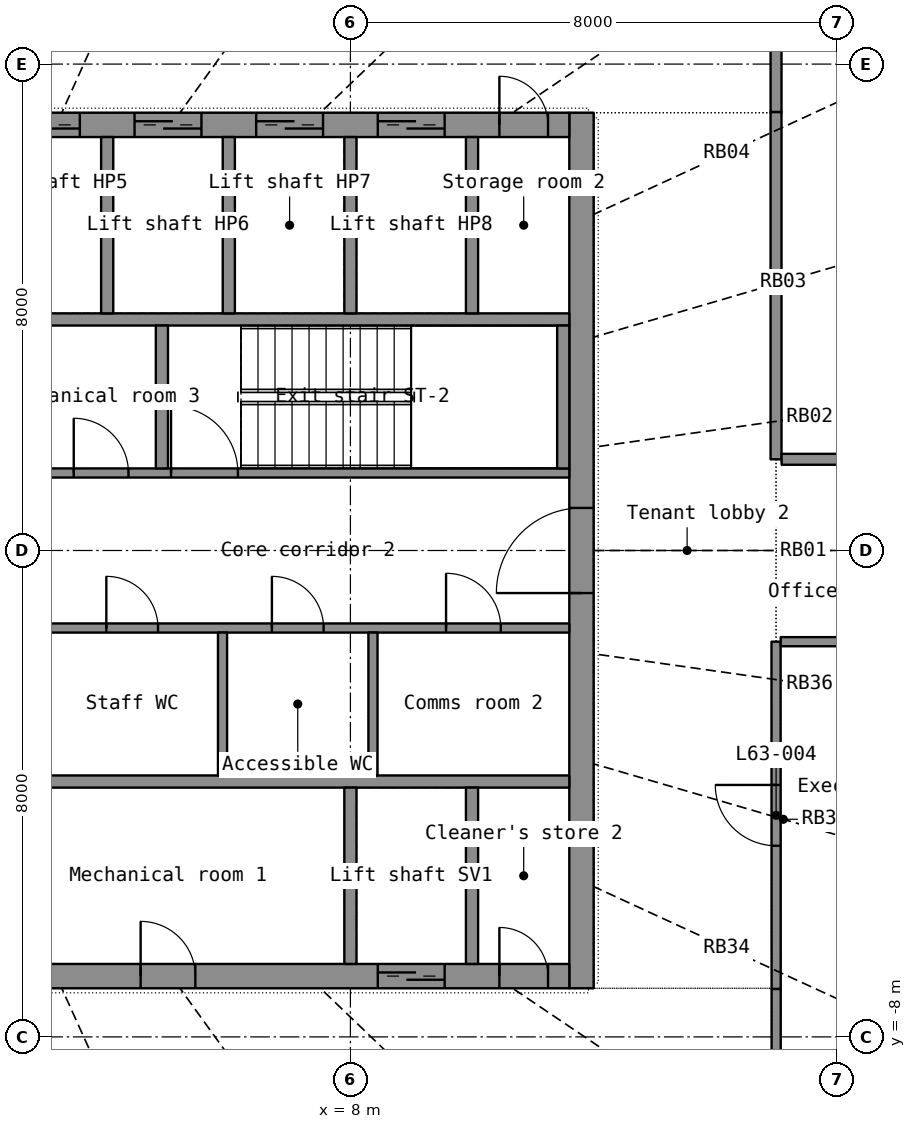
"""IFC4 building model, lengths in metres.
Left out: names, types, materials, properties, quantities, classifications, styles, units other than length and angle.
Written with IfcOpenShell. Run it as: python <this file> out.ifc"""

import sys

from ifc_helpers import new_model, si_unit, direction, frame, frame_2d, origin, place, context, subcontext, project, spatial, rectangle, extrude, element, fill, save


model = new_model("IFC4")
c1 = context("Model", 3, precision=1e-05, world=origin(), true_north=direction((0.0, 1.0)))
c2 = subcontext(c1, "Body", "Model", "MODEL_VIEW")
j1 = project(units=[si_unit("LENGTHUNIT", "METRE"), si_unit("PLANEANGLEUNIT", "RADIAN")], contexts=[c1])
p1 = place(None, origin())
s1 = spatial("IfcSite", under=j1, at=p1, CompositionType="ELEMENT")
p2 = place(p1, origin())
s2 = spatial("IfcBuilding", under=s1, at=p2, CompositionType="ELEMENT")
p3 = place(p2, frame((0.0, 0.0, 257.8)))
s3 = spatial("IfcBuildingStorey", under=s2, at=p3, CompositionType="ELEMENT", Elevation=257.8)
p4 = place(p3, frame((11.8, -7.2, 0.0), z_axis=(0.0, 0.0, 1.0), x_axis=(0.0, 1.0, 0.0)))
e1 = element("IfcWall", 1, at=p4, inside=s3, PredefinedType="SHEAR", context=c2, shape_type="SweptSolid", body=[
    extrude(rectangle(XDim=14.4, YDim=0.4, at=frame_2d((7.2, 0.0))), origin(), (0.0, 0.0, 1.0), 3.3),
])
p5 = place(p4, frame((6.5, 0.0, 0.0)))
e2 = element("IfcOpeningElement", 2, at=p5, cuts=e1, PredefinedType="OPENING", context=c2, shape_type="SweptSolid", body=[
    extrude(rectangle(XDim=1.4, YDim=2.2, at=frame_2d((0.7, 1.1))), frame((0.0, 0.21, 0.0), z_axis=(0.0, -1.0, 0.0), x_axis=(1.0, 0.0, 0.0)), (0.0, 0.0, 1.0), 0.42),
])
p6 = place(p3, frame((-11.6, -7.0, 0.0), z_axis=(0.0, 0.0, 1.0), x_axis=(1.0, 0.0, 0.0)))
e3 = element("IfcWall", 3, at=p6, inside=s3, PredefinedType="SHEAR", context=c2, shape_type="SweptSolid", body=[
    extrude(rectangle(XDim=23.2, YDim=0.4, at=frame_2d((11.6, 0.0))), origin(), (0.0, 0.0, 1.0), 3.3),
])
p7 = place(p6, frame((20.05, 0.0, 0.0)))
e4 = element("IfcOpeningElement", 4, at=p7, cuts=e3, PredefinedType="OPENING", context=c2, shape_type="SweptSolid", body=[
    extrude(rectangle(XDim=1.1, YDim=2.2, at=frame_2d((0.55, 1.1))), frame((0.0, 0.21, 0.0), z_axis=(0.0, -1.0, 0.0), x_axis=(1.0, 0.0, 0.0)), (0.0, 0.0, 1.0), 0.42),
])
p8 = place(p6, frame((4.15, 0.0, 0.0)))
e5 = element("IfcOpeningElement", 5, at=p8, cuts=e3, PredefinedType="OPENING", context=c2, shape_type="SweptSolid", body=[
    extrude(rectangle(XDim=0.9, YDim=2.1, at=frame_2d((0.45, 1.05))), frame((0.0, 0.21, 0.0), z_axis=(0.0, -1.0, 0.0), x_axis=(1.0, 0.0, 0.0)), (0.0, 0.0, 1.0), 0.42),
])
p9 = place(p6, frame((10.15, 0.0, 0.0)))
e6 = element("IfcOpeningElement", 6, at=p9, cuts=e3, PredefinedType="OPENING", context=c2, shape_type="SweptSolid", body=[
    extrude(rectangle(XDim=0.9, YDim=2.1, at=frame_2d((0.45, 1.05))), frame((0.0, 0.21, 0.0), z_axis=(0.0, -1.0, 0.0), x_axis=(1.0, 0.0, 0.0)), (0.0, 0.0, 1.0), 0.42),
])
p10 = place(p6, frame((16.15, 0.0, 0.0)))
e7 = element("IfcOpeningElement", 7, at=p10, cuts=e3, PredefinedType="OPENING", context=c2, shape_type="SweptSolid", body=[
    extrude(rectangle(XDim=0.9, YDim=2.1, at=frame_2d((0.45, 1.05))), frame((0.0, 0.21, 0.0), z_axis=(0.0, -1.0, 0.0), x_axis=(1.0, 0.0, 0.0)), (0.0, 0.0, 1.0), 0.42),
])
p11 = place(p6, frame((0.35, 0.0, 0.0)))
e8 = element("IfcOpeningElement", 8, at=p11, cuts=e3, PredefinedType="OPENING", context=c2, shape_type="SweptSolid", body=[
    extrude(rectangle(XDim=0.8, YDim=2.05, at=frame_2d((0.4, 1.025))), frame((0.0, 0.21, 0.0), z_axis=(0.0, -1.0, 0.0), x_axis=(1.0, 0.0, 0.0)), (0.0, 0.0, 1.0), 0.42),
])
p12 = place(p6, frame((22.05, 0.0, 0.0)))
e9 = element("IfcOpeningElement", 9, at=p12, cuts=e3, PredefinedType="OPENING", context=c2, shape_type="SweptSolid", body=[
    extrude(rectangle(XDim=0.8, YDim=2.05, at=frame_2d((0.4, 1.025))), frame((0.0, 0.21, 0.0), z_axis=(0.0, -1.0, 0.0), x_axis=(1.0, 0.0, 0.0)), (0.0, 0.0, 1.0), 0.42),
])
p13 = place(p3, frame((-11.6, 7.0, 0.0), z_axis=(0.0, 0.0, 1.0), x_axis=(1.0, 0.0, 0.0)))
e10 = element("IfcWall", 10, at=p13, inside=s3, PredefinedType="SHEAR", context=c2, shape_type="SweptSolid", body=[
    extrude(rectangle(XDim=23.2, YDim=0.4, at=frame_2d((11.6, 0.0))), origin(), (0.0, 0.0, 1.0), 3.3),
])
p14 = place(p13, frame((2.05, 0.0, 0.0)))
e11 = element("IfcOpeningElement", 11, at=p14, cuts=e10, PredefinedType="OPENING", context=c2, shape_type="SweptSolid", body=[
    extrude(rectangle(XDim=1.1, YDim=2.2, at=frame_2d((0.55, 1.1))), frame((0.0, 0.21, 0.0), z_axis=(0.0, -1.0, 0.0), x_axis=(1.0, 0.0, 0.0)), (0.0, 0.0, 1.0), 0.42),
])
p15 = place(p13, frame((6.05, 0.0, 0.0)))
e12 = element("IfcOpeningElement", 12, at=p15, cuts=e10, PredefinedType="OPENING", context=c2, shape_type="SweptSolid", body=[
    extrude(rectangle(XDim=1.1, YDim=2.2, at=frame_2d((0.55, 1.1))), frame((0.0, 0.21, 0.0), z_axis=(0.0, -1.0, 0.0), x_axis=(1.0, 0.0, 0.0)), (0.0, 0.0, 1.0), 0.42),
])
p16 = place(p13, frame((8.05, 0.0, 0.0)))
e13 = element("IfcOpeningElement", 13, at=p16, cuts=e10, PredefinedType="OPENING", context=c2, shape_type="SweptSolid", body=[
    extrude(rectangle(XDim=1.1, YDim=2.2, at=frame_2d((0.55, 1.1))), frame((0.0, 0.21, 0.0), z_axis=(0.0, -1.0, 0.0), x_axis=(1.0, 0.0, 0.0)), (0.0, 0.0, 1.0), 0.42),
])
p17 = place(p13, frame((10.05, 0.0, 0.0)))
e14 = element("IfcOpeningElement", 14, at=p17, cuts=e10, PredefinedType="OPENING", context=c2, shape_type="SweptSolid", body=[
    extrude(rectangle(XDim=1.1, YDim=2.2, at=frame_2d((0.55, 1.1))), frame((0.0, 0.21, 0.0), z_axis=(0.0, -1.0, 0.0), x_axis=(1.0, 0.0, 0.0)), (0.0, 0.0, 1.0), 0.42),
])
p18 = place(p13, frame((12.05, 0.0, 0.0)))
e15 = element("IfcOpeningElement", 15, at=p18, cuts=e10, PredefinedType="OPENING", context=c2, shape_type="SweptSolid", body=[
    extrude(rectangle(XDim=1.1, YDim=2.2, at=frame_2d((0.55, 1.1))), frame((0.0, 0.21, 0.0), z_axis=(0.0, -1.0, 0.0), x_axis=(1.0, 0.0, 0.0)), (0.0, 0.0, 1.0), 0.42),
])
p19 = place(p13, frame((14.05, 0.0, 0.0)))
e16 = element("IfcOpeningElement", 16, at=p19, cuts=e10, PredefinedType="OPENING", context=c2, shape_type="SweptSolid", body=[
    extrude(rectangle(XDim=1.1, YDim=2.2, at=frame_2d((0.55, 1.1))), frame((0.0, 0.21, 0.0), z_axis=(0.0, -1.0, 0.0), x_axis=(1.0, 0.0, 0.0)), (0.0, 0.0, 1.0), 0.42),
])
p20 = place(p13, frame((16.05, 0.0, 0.0)))
e17 = element("IfcOpeningElement", 17, at=p20, cuts=e10, PredefinedType="OPENING", context=c2, shape_type="SweptSolid", body=[
    extrude(rectangle(XDim=1.1, YDim=2.2, at=frame_2d((0.55, 1.1))), frame((0.0, 0.21, 0.0), z_axis=(0.0, -1.0, 0.0), x_axis=(1.0, 0.0, 0.0)), (0.0, 0.0, 1.0), 0.42),
])
p21 = place(p13, frame((18.05, 0.0, 0.0)))
e18 = element("IfcOpeningElement", 18, at=p21, cuts=e10, PredefinedType="OPENING", context=c2, shape_type="SweptSolid", body=[
    extrude(rectangle(XDim=1.1, YDim=2.2, at=frame_2d((0.55, 1.1))), frame((0.0, 0.21, 0.0), z_axis=(0.0, -1.0, 0.0), x_axis=(1.0, 0.0, 0.0)), (0.0, 0.0, 1.0), 0.42),
])
p22 = place(p13, frame((20.05, 0.0, 0.0)))
e19 = element("IfcOpeningElement", 19, at=p22, cuts=e10, PredefinedType="OPENING", context=c2, shape_type="SweptSolid", body=[
    extrude(rectangle(XDim=1.1, YDim=2.2, at=frame_2d((0.55, 1.1))), frame((0.0, 0.21, 0.0), z_axis=(0.0, -1.0, 0.0), x_axis=(1.0, 0.0, 0.0)), (0.0, 0.0, 1.0), 0.42),
])
p23 = place(p13, frame((4.15, 0.0, 0.0)))
e20 = element("IfcOpeningElement", 20, at=p23, cuts=e10, PredefinedType="OPENING", context=c2, shape_type="SweptSolid", body=[
    extrude(rectangle(XDim=0.9, YDim=2.1, at=frame_2d((0.45, 1.05))), frame((0.0, 0.21, 0.0), z_axis=(0.0, -1.0, 0.0), x_axis=(1.0, 0.0, 0.0)), (0.0, 0.0, 1.0), 0.42),
])
p24 = place(p13, frame((0.35, 0.0, 0.0)))
e21 = element("IfcOpeningElement", 21, at=p24, cuts=e10, PredefinedType="OPENING", context=c2, shape_type="SweptSolid", body=[
    extrude(rectangle(XDim=0.8, YDim=2.05, at=frame_2d((0.4, 1.025))), frame((0.0, 0.21, 0.0), z_axis=(0.0, -1.0, 0.0), x_axis=(1.0, 0.0, 0.0)), (0.0, 0.0, 1.0), 0.42),
])
p25 = place(p13, frame((22.05, 0.0, 0.0)))
e22 = element("IfcOpeningElement", 22, at=p25, cuts=e10, PredefinedType="OPENING", context=c2, shape_type="SweptSolid", body=[
    extrude(rectangle(XDim=0.8, YDim=2.05, at=frame_2d((0.4, 1.025))), frame((0.0, 0.21, 0.0), z_axis=(0.0, -1.0, 0.0), x_axis=(1.0, 0.0, 0.0)), (0.0, 0.0, 1.0), 0.42),
])
for number, where, z_axis, x_axis in (
    (23, (-11.6, -3.8, 0.0), (0.0, 0.0, 1.0), (1.0, 0.0, 0.0)),
    (24, (-11.6, 3.8, 0.0), (0.0, 0.0, 1.0), (1.0, 0.0, 0.0)),
):
    element("IfcWall", number, at=place(p3, frame(where, z_axis=z_axis, x_axis=x_axis)), inside=s3, PredefinedType="SHEAR", context=c2, shape_type="SweptSolid", body=[
        extrude(rectangle(XDim=23.2, YDim=0.2, at=frame_2d((11.6, 0.0))), origin(), (0.0, 0.0, 1.0), 3.3),
    ])
for number, where, z_axis, x_axis in (
    (25, (8.0, -6.8, 0.0), (0.0, 0.0, 1.0), (0.0, 1.0, 0.0)),
    (26, (10.0, -6.8, 0.0), (0.0, 0.0, 1.0), (0.0, 1.0, 0.0)),
    (27, (4.0, 3.9, 0.0), (0.0, 0.0, 1.0), (0.0, 1.0, 0.0)),
    (28, (6.0, 3.9, 0.0), (0.0, 0.0, 1.0), (0.0, 1.0, 0.0)),
    (29, (8.0, 3.9, 0.0), (0.0, 0.0, 1.0), (0.0, 1.0, 0.0)),
    (30, (10.0, 3.9, 0.0), (0.0, 0.0, 1.0), (0.0, 1.0, 0.0)),
):
    element("IfcWall", number, at=place(p3, frame(where, z_axis=z_axis, x_axis=x_axis)), inside=s3, PredefinedType="SHEAR", context=c2, shape_type="SweptSolid", body=[
        extrude(rectangle(XDim=2.9, YDim=0.2, at=frame_2d((1.45, 0.0))), origin(), (0.0, 0.0, 1.0), 3.3),
    ])
p26 = place(p3, frame((3.0, -1.275, 0.0), z_axis=(0.0, 0.0, 1.0), x_axis=(1.0, 0.0, 0.0)))
e31 = element("IfcWall", 31, at=p26, inside=s3, PredefinedType="PARTITIONING", context=c2, shape_type="SweptSolid", body=[
    extrude(rectangle(XDim=8.6, YDim=0.15, at=frame_2d((4.3, 0.0))), origin(), (0.0, 0.0, 1.0), 3.3),
])
p27 = place(p26, frame((0.986, 0.0, 0.0)))
e32 = element("IfcOpeningElement", 32, at=p27, cuts=e31, PredefinedType="OPENING", context=c2, shape_type="SweptSolid", body=[
    extrude(rectangle(XDim=0.85, YDim=2.1, at=frame_2d((0.425, 1.05))), frame((0.0, 0.085, 0.0), z_axis=(0.0, -1.0, 0.0), x_axis=(1.0, 0.0, 0.0)), (0.0, 0.0, 1.0), 0.17),
])
p28 = place(p26, frame((3.709, 0.0, 0.0)))
e33 = element("IfcOpeningElement", 33, at=p28, cuts=e31, PredefinedType="OPENING", context=c2, shape_type="SweptSolid", body=[
    extrude(rectangle(XDim=0.85, YDim=2.1, at=frame_2d((0.425, 1.05))), frame((0.0, 0.085, 0.0), z_axis=(0.0, -1.0, 0.0), x_axis=(1.0, 0.0, 0.0)), (0.0, 0.0, 1.0), 0.17),
])
p29 = place(p26, frame((6.573, 0.0, 0.0)))
e34 = element("IfcOpeningElement", 34, at=p29, cuts=e31, PredefinedType="OPENING", context=c2, shape_type="SweptSolid", body=[
    extrude(rectangle(XDim=0.9, YDim=2.1, at=frame_2d((0.45, 1.05))), frame((0.0, 0.085, 0.0), z_axis=(0.0, -1.0, 0.0), x_axis=(1.0, 0.0, 0.0)), (0.0, 0.0, 1.0), 0.17),
])
p30 = place(p3, frame((3.0, 1.275, 0.0), z_axis=(0.0, 0.0, 1.0), x_axis=(1.0, 0.0, 0.0)))
e35 = element("IfcWall", 35, at=p30, inside=s3, PredefinedType="SHEAR", context=c2, shape_type="SweptSolid", body=[
    extrude(rectangle(XDim=8.6, YDim=0.15, at=frame_2d((4.3, 0.0))), origin(), (0.0, 0.0, 1.0), 3.3),
])
p31 = place(p30, frame((2.05, 0.0, 0.0)))
e36 = element("IfcOpeningElement", 36, at=p31, cuts=e35, PredefinedType="OPENING", context=c2, shape_type="SweptSolid", body=[
    extrude(rectangle(XDim=1.1, YDim=2.15, at=frame_2d((0.55, 1.075))), frame((0.0, 0.085, 0.0), z_axis=(0.0, -1.0, 0.0), x_axis=(1.0, 0.0, 0.0)), (0.0, 0.0, 1.0), 0.17),
])
p32 = place(p30, frame((0.45, 0.0, 0.0)))
e37 = element("IfcOpeningElement", 37, at=p32, cuts=e35, PredefinedType="OPENING", context=c2, shape_type="SweptSolid", body=[
    extrude(rectangle(XDim=0.9, YDim=2.1, at=frame_2d((0.45, 1.05))), frame((0.0, 0.085, 0.0), z_axis=(0.0, -1.0, 0.0), x_axis=(1.0, 0.0, 0.0)), (0.0, 0.0, 1.0), 0.17),
])
for number, where, z_axis, x_axis in (
    (38, (11.5, 1.35, 0.0), (0.0, 0.0, 1.0), (0.0, 1.0, 0.0)),
    (39, (4.9, 1.35, 0.0), (0.0, 0.0, 1.0), (0.0, 1.0, 0.0)),
):
    element("IfcWall", number, at=place(p3, frame(where, z_axis=z_axis, x_axis=x_axis)), inside=s3, PredefinedType="SHEAR", context=c2, shape_type="SweptSolid", body=[
        extrude(rectangle(XDim=2.35, YDim=0.2, at=frame_2d((1.175, 0.0))), origin(), (0.0, 0.0, 1.0), 3.3),
    ])
for number, where, z_axis, x_axis in (
    (40, (5.897, -3.7, 0.0), (0.0, 0.0, 1.0), (0.0, 1.0, 0.0)),
    (41, (8.371, -3.7, 0.0), (0.0, 0.0, 1.0), (0.0, 1.0, 0.0)),
):
    element("IfcWall", number, at=place(p3, frame(where, z_axis=z_axis, x_axis=x_axis)), inside=s3, PredefinedType="PARTITIONING", context=c2, shape_type="SweptSolid", body=[
        extrude(rectangle(XDim=2.35, YDim=0.15, at=frame_2d((1.175, 0.0))), origin(), (0.0, 0.0, 1.0), 3.3),
    ])
p33 = place(p3, frame((15.0, 1.5, 0.0), z_axis=(0.0, 0.0, 1.0), x_axis=(0.0, 1.0, 0.0)))
e42 = element("IfcWall", 42, at=p33, inside=s3, PredefinedType="PARTITIONING", context=c2, shape_type="SweptSolid", body=[
    extrude(rectangle(XDim=5.712, YDim=0.18, at=frame_2d((2.856, 0.0))), origin(), (0.0, 0.0, 1.0), 2.4),
])
p34 = place(p3, frame((15.002, -7.212, 0.0), z_axis=(0.0, 0.0, 1.0), x_axis=(-0.000341939, 0.999999942, 0.0)))
e43 = element("IfcWall", 43, at=p34, inside=s3, PredefinedType="PARTITIONING", context=c2, shape_type="SweptSolid", body=[
    extrude(rectangle(XDim=5.712, YDim=0.15, at=frame_2d((2.856, 0.0))), origin(), (0.0, 0.0, 1.0), 2.4),
])
p35 = place(p34, frame((2.356, 0.0, 0.0)))
e44 = element("IfcOpeningElement", 44, at=p35, cuts=e43, PredefinedType="OPENING", context=c2, shape_type="SweptSolid", body=[
    extrude(rectangle(XDim=1.0, YDim=2.4, at=frame_2d((0.5, 1.2))), frame((0.0, 0.085, 0.0), z_axis=(0.0, -1.0, 0.0), x_axis=(1.0, 0.0, 0.0)), (0.0, 0.0, 1.0), 0.17),
])
p36 = place(p3, frame((15.077, -1.5, 0.0), z_axis=(0.0, 0.0, 1.0), x_axis=(1.0, 0.0, 0.0)))
e45 = element("IfcWall", 45, at=p36, inside=s3, PredefinedType="PARTITIONING", context=c2, shape_type="SweptSolid", body=[
    extrude(rectangle(XDim=2.871, YDim=0.15, at=frame_2d((1.436, 0.0))), origin(), (0.0, 0.0, 1.0), 2.4),
])
p37 = place(p3, frame((17.948, 1.5, 0.0), z_axis=(0.0, 0.0, 1.0), x_axis=(-1.0, 0.0, 0.0)))
e46 = element("IfcWall", 46, at=p37, inside=s3, PredefinedType="PARTITIONING", context=c2, shape_type="SweptSolid", body=[
    extrude(rectangle(XDim=2.856, YDim=0.18, at=frame_2d((1.428, 0.0))), origin(), (0.0, 0.0, 1.0), 2.4),
])
p38 = place(p3, frame((15.002, -9.525, 0.0), z_axis=(0.0, 0.0, 1.0), x_axis=(0.0, 1.0, 0.0)))
e47 = element("IfcWall", 47, at=p38, inside=s3, PredefinedType="PARTITIONING", context=c2, shape_type="SweptSolid", body=[
    extrude(rectangle(XDim=2.312, YDim=0.15, at=frame_2d((1.156, 0.0))), origin(), (0.0, 0.0, 1.0), 2.4),
])
p39 = place(p3, frame((15.0, 7.213, 0.0), z_axis=(0.0, 0.0, 1.0), x_axis=(0.0, 1.0, 0.0)))
e48 = element("IfcWall", 48, at=p39, inside=s3, PredefinedType="PARTITIONING", context=c2, shape_type="SweptSolid", body=[
    extrude(rectangle(XDim=2.295, YDim=0.18, at=frame_2d((1.147, 0.0))), origin(), (0.0, 0.0, 1.0), 2.4),
])
p40 = place(p7, origin())
e49 = element("IfcDoor", 49, at=p40, inside=s3, OperationType="DOUBLE_DOOR_SLIDING", PredefinedType="DOOR", context=c2, shape_type="SweptSolid", body=[
    extrude(rectangle(XDim=1.1, YDim=2.2, at=frame_2d((0.55, 1.1))), frame((0.0, 0.025, 0.0), z_axis=(0.0, -1.0, 0.0), x_axis=(1.0, 0.0, 0.0)), (0.0, 0.0, 1.0), 0.05),
])
fill(e4, e49)
p41 = place(p10, origin())
e50 = element("IfcDoor", 50, at=p41, inside=s3, OperationType="SINGLE_SWING_LEFT", PredefinedType="DOOR", context=c2, shape_type="SweptSolid", body=[
    extrude(rectangle(XDim=0.9, YDim=2.1, at=frame_2d((0.45, 1.05))), frame((0.0, 0.025, 0.0), z_axis=(0.0, -1.0, 0.0), x_axis=(1.0, 0.0, 0.0)), (0.0, 0.0, 1.0), 0.05),
])
fill(e7, e50)
p42 = place(p12, origin())
e51 = element("IfcDoor", 51, at=p42, inside=s3, OperationType="SINGLE_SWING_LEFT", PredefinedType="DOOR", context=c2, shape_type="SweptSolid", body=[
    extrude(rectangle(XDim=0.8, YDim=2.05, at=frame_2d((0.4, 1.025))), frame((0.0, 0.025, 0.0), z_axis=(0.0, -1.0, 0.0), x_axis=(1.0, 0.0, 0.0)), (0.0, 0.0, 1.0), 0.05),
])
fill(e9, e51)
p43 = place(p19, origin())
e52 = element("IfcDoor", 52, at=p43, inside=s3, OperationType="DOUBLE_DOOR_SLIDING", PredefinedType="DOOR", context=c2, shape_type="SweptSolid", body=[
    extrude(rectangle(XDim=1.1, YDim=2.2, at=frame_2d((0.55, 1.1))), frame((0.0, 0.025, 0.0), z_axis=(0.0, -1.0, 0.0), x_axis=(1.0, 0.0, 0.0)), (0.0, 0.0, 1.0), 0.05),
])
fill(e16, e52)
p44 = place(p20, origin())
e53 = element("IfcDoor", 53, at=p44, inside=s3, OperationType="DOUBLE_DOOR_SLIDING", PredefinedType="DOOR", context=c2, shape_type="SweptSolid", body=[
    extrude(rectangle(XDim=1.1, YDim=2.2, at=frame_2d((0.55, 1.1))), frame((0.0, 0.025, 0.0), z_axis=(0.0, -1.0, 0.0), x_axis=(1.0, 0.0, 0.0)), (0.0, 0.0, 1.0), 0.05),
])
fill(e17, e53)
p45 = place(p21, origin())
e54 = element("IfcDoor", 54, at=p45, inside=s3, OperationType="DOUBLE_DOOR_SLIDING", PredefinedType="DOOR", context=c2, shape_type="SweptSolid", body=[
    extrude(rectangle(XDim=1.1, YDim=2.2, at=frame_2d((0.55, 1.1))), frame((0.0, 0.025, 0.0), z_axis=(0.0, -1.0, 0.0), x_axis=(1.0, 0.0, 0.0)), (0.0, 0.0, 1.0), 0.05),
])
fill(e18, e54)
p46 = place(p22, origin())
e55 = element("IfcDoor", 55, at=p46, inside=s3, OperationType="DOUBLE_DOOR_SLIDING", PredefinedType="DOOR", context=c2, shape_type="SweptSolid", body=[
    extrude(rectangle(XDim=1.1, YDim=2.2, at=frame_2d((0.55, 1.1))), frame((0.0, 0.025, 0.0), z_axis=(0.0, -1.0, 0.0), x_axis=(1.0, 0.0, 0.0)), (0.0, 0.0, 1.0), 0.05),
])
fill(e19, e55)
p47 = place(p25, origin())
e56 = element("IfcDoor", 56, at=p47, inside=s3, OperationType="SINGLE_SWING_LEFT", PredefinedType="DOOR", context=c2, shape_type="SweptSolid", body=[
    extrude(rectangle(XDim=0.8, YDim=2.05, at=frame_2d((0.4, 1.025))), frame((0.0, 0.025, 0.0), z_axis=(0.0, -1.0, 0.0), x_axis=(1.0, 0.0, 0.0)), (0.0, 0.0, 1.0), 0.05),
])
fill(e22, e56)
p48 = place(p5, origin())
e57 = element("IfcDoor", 57, at=p48, inside=s3, OperationType="DOUBLE_DOOR_SINGLE_SWING", PredefinedType="DOOR", context=c2, shape_type="SweptSolid", body=[
    extrude(rectangle(XDim=1.4, YDim=2.2, at=frame_2d((0.7, 1.1))), frame((0.0, 0.025, 0.0), z_axis=(0.0, -1.0, 0.0), x_axis=(1.0, 0.0, 0.0)), (0.0, 0.0, 1.0), 0.05),
])
fill(e2, e57)
p49 = place(p31, origin())
e58 = element("IfcDoor", 58, at=p49, inside=s3, OperationType="SINGLE_SWING_LEFT", PredefinedType="DOOR", context=c2, shape_type="SweptSolid", body=[
    extrude(rectangle(XDim=1.1, YDim=2.15, at=frame_2d((0.55, 1.075))), frame((0.0, 0.025, 0.0), z_axis=(0.0, -1.0, 0.0), x_axis=(1.0, 0.0, 0.0)), (0.0, 0.0, 1.0), 0.05),
])
fill(e36, e58)
p50 = place(p27, origin())
e59 = element("IfcDoor", 59, at=p50, inside=s3, OperationType="SINGLE_SWING_LEFT", PredefinedType="DOOR", context=c2, shape_type="SweptSolid", body=[
    extrude(rectangle(XDim=0.85, YDim=2.1, at=frame_2d((0.425, 1.05))), frame((0.0, 0.025, 0.0), z_axis=(0.0, -1.0, 0.0), x_axis=(1.0, 0.0, 0.0)), (0.0, 0.0, 1.0), 0.05),
])
fill(e32, e59)
p51 = place(p28, origin())
e60 = element("IfcDoor", 60, at=p51, inside=s3, OperationType="SINGLE_SWING_LEFT", PredefinedType="DOOR", context=c2, shape_type="SweptSolid", body=[
    extrude(rectangle(XDim=0.85, YDim=2.1, at=frame_2d((0.425, 1.05))), frame((0.0, 0.025, 0.0), z_axis=(0.0, -1.0, 0.0), x_axis=(1.0, 0.0, 0.0)), (0.0, 0.0, 1.0), 0.05),
])
fill(e33, e60)
p52 = place(p29, origin())
e61 = element("IfcDoor", 61, at=p52, inside=s3, OperationType="SINGLE_SWING_LEFT", PredefinedType="DOOR", context=c2, shape_type="SweptSolid", body=[
    extrude(rectangle(XDim=0.9, YDim=2.1, at=frame_2d((0.45, 1.05))), frame((0.0, 0.025, 0.0), z_axis=(0.0, -1.0, 0.0), x_axis=(1.0, 0.0, 0.0)), (0.0, 0.0, 1.0), 0.05),
])
fill(e34, e61)
p53 = place(p32, origin())
e62 = element("IfcDoor", 62, at=p53, inside=s3, OperationType="SINGLE_SWING_LEFT", PredefinedType="DOOR", context=c2, shape_type="SweptSolid", body=[
    extrude(rectangle(XDim=0.9, YDim=2.1, at=frame_2d((0.45, 1.05))), frame((0.0, 0.025, 0.0), z_axis=(0.0, -1.0, 0.0), x_axis=(1.0, 0.0, 0.0)), (0.0, 0.0, 1.0), 0.05),
])
fill(e37, e62)
p54 = place(p35, origin())
e63 = element("IfcDoor", 63, at=p54, inside=s3, OperationType="SINGLE_SWING_RIGHT", PredefinedType="DOOR", context=c2, shape_type="SweptSolid", body=[
    extrude(rectangle(XDim=1.0, YDim=2.4, at=frame_2d((0.5, 1.2))), frame((0.0, 0.025, 0.0), z_axis=(0.0, -1.0, 0.0), x_axis=(1.0, 0.0, 0.0)), (0.0, 0.0, 1.0), 0.05),
])
fill(e44, e63)
save(model, sys.argv[1])
